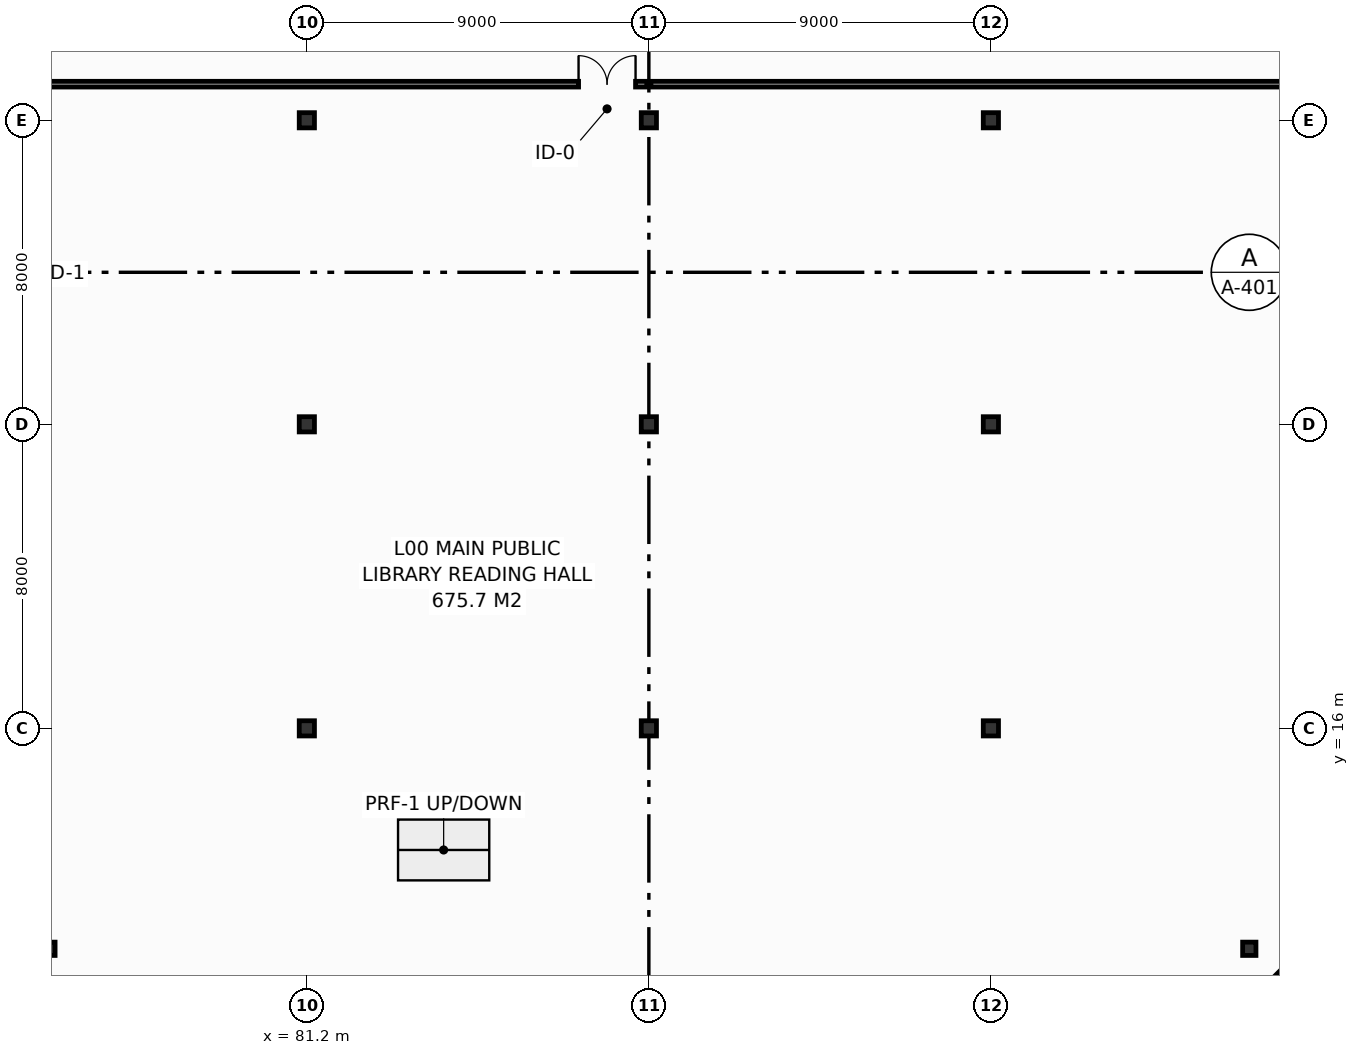
"""IFC4 building model, lengths in metres.
Left out: names, types, materials, properties, quantities, classifications, styles, units other than length and angle.
Written with IfcOpenShell. Run it as: python <this file> out.ifc"""

import sys

from ifc_helpers import new_model, si_unit, direction, frame, frame_2d, origin, origin_2d, place, context, subcontext, project, spatial, rectangle, i_section, extrude, element, fill, save


model = new_model("IFC4")
c1 = context("Model", 3, precision=1e-05, world=origin(), true_north=direction((0.0, 1.0)))
c2 = subcontext(c1, "Body", "Model", "MODEL_VIEW")
j1 = project(units=[si_unit("LENGTHUNIT", "METRE"), si_unit("PLANEANGLEUNIT", "RADIAN")], contexts=[c1])
p1 = place(None, origin())
s1 = spatial("IfcSite", under=j1, at=p1, CompositionType="ELEMENT")
p2 = place(p1, origin())
s2 = spatial("IfcBuilding", under=s1, at=p2, CompositionType="ELEMENT")
p3 = place(p2, origin())
s3 = spatial("IfcBuildingStorey", under=s2, at=p3, CompositionType="ELEMENT", Elevation=0.0)
p4 = place(p3, frame((74.4, 10.2, 0.0), z_axis=(0.0, 0.0, 1.0), x_axis=(1.0, 0.0, 0.0)))
e1 = element("IfcColumn", 1, at=p4, inside=s3, PredefinedType="COLUMN", context=c2, shape_type="SweptSolid", body=[
    extrude(i_section(OverallWidth=0.35, OverallDepth=0.35, WebThickness=0.012, FlangeThickness=0.019, FilletRadius=0.02, at=origin_2d()), origin(), (0.0, 0.0, 1.0), 6.0),
])
for number, where, z_axis, x_axis in (
    (2, (81.2, 16.0, 0.0), (0.0, 0.0, 1.0), (1.0, 0.0, 0.0)),
    (3, (81.2, 24.0, 0.0), (0.0, 0.0, 1.0), (1.0, 0.0, 0.0)),
    (4, (81.2, 32.0, 0.0), (0.0, 0.0, 1.0), (1.0, 0.0, 0.0)),
    (5, (90.2, 16.0, 0.0), (0.0, 0.0, 1.0), (1.0, 0.0, 0.0)),
    (6, (90.2, 24.0, 0.0), (0.0, 0.0, 1.0), (1.0, 0.0, 0.0)),
    (7, (90.2, 32.0, 0.0), (0.0, 0.0, 1.0), (1.0, 0.0, 0.0)),
    (8, (99.2, 16.0, 0.0), (0.0, 0.0, 1.0), (1.0, 0.0, 0.0)),
    (9, (99.2, 24.0, 0.0), (0.0, 0.0, 1.0), (1.0, 0.0, 0.0)),
    (10, (99.2, 32.0, 0.0), (0.0, 0.0, 1.0), (1.0, 0.0, 0.0)),
):
    element("IfcColumn", number, at=place(p3, frame(where, z_axis=z_axis, x_axis=x_axis)), inside=s3, PredefinedType="COLUMN", context=c2, shape_type="SweptSolid", body=[
        extrude(i_section(OverallWidth=0.4, OverallDepth=0.4, WebThickness=0.013, FlangeThickness=0.021, FilletRadius=0.022, at=origin_2d()), origin(), (0.0, 0.0, 1.0), 6.0),
    ])
p5 = place(p3, frame((106.0, 10.2, 0.0), z_axis=(0.0, 0.0, 1.0), x_axis=(1.0, 0.0, 0.0)))
e11 = element("IfcColumn", 11, at=p5, inside=s3, PredefinedType="COLUMN", context=c2, shape_type="SweptSolid", body=[
    extrude(i_section(OverallWidth=0.35, OverallDepth=0.35, WebThickness=0.012, FlangeThickness=0.019, FilletRadius=0.02, at=origin_2d()), origin(), (0.0, 0.0, 1.0), 6.0),
])
p6 = place(p3, frame((74.887, 8.113, 0.0), z_axis=(0.0, 0.0, 1.0), x_axis=(-0.707106781187, 0.707106781187, 0.0)))
e12 = element("IfcWall", 12, at=p6, inside=s3, PredefinedType="STANDARD", context=c2, shape_type="SweptSolid", body=[
    extrude(rectangle(XDim=3.64, YDim=0.3, at=frame_2d((1.82, 0.0))), origin(), (0.0, 0.0, 1.0), 5.7),
])
p7 = place(p3, frame((108.087, 10.687, 0.0), z_axis=(0.0, 0.0, 1.0), x_axis=(-0.707073244381, -0.707140316402, 0.0)))
e13 = element("IfcWall", 13, at=p7, inside=s3, PredefinedType="STANDARD", context=c2, shape_type="SweptSolid", body=[
    extrude(rectangle(XDim=3.64, YDim=0.3, at=frame_2d((1.82, 0.0))), origin(), (0.0, 0.0, 1.0), 5.7),
])
p8 = place(p3, frame((72.37, 32.95, 0.0), z_axis=(0.0, 0.0, 1.0), x_axis=(1.0, 0.0, 0.0)))
e14 = element("IfcWall", 14, at=p8, inside=s3, PredefinedType="PARTITIONING", context=c2, shape_type="SweptSolid", body=[
    extrude(rectangle(XDim=35.66, YDim=0.15, at=frame_2d((17.83, 0.0))), origin(), (0.0, 0.0, 1.0), 4.985),
])
p9 = place(p8, frame((15.98, 0.0, 0.0)))
e15 = element("IfcOpeningElement", 15, at=p9, cuts=e14, PredefinedType="OPENING", context=c2, shape_type="SweptSolid", body=[
    extrude(rectangle(XDim=1.5, YDim=2.2, at=frame_2d((0.75, 1.1))), frame((0.0, 0.085, 0.0), z_axis=(0.0, -1.0, 0.0), x_axis=(1.0, 0.0, 0.0)), (0.0, 0.0, 1.0), 0.17),
])
p10 = place(p9, origin())
e16 = element("IfcDoor", 16, at=p10, inside=s3, OperationType="DOUBLE_DOOR_SINGLE_SWING", PredefinedType="DOOR", context=c2, shape_type="SweptSolid", body=[
    extrude(rectangle(XDim=1.5, YDim=2.2, at=frame_2d((0.75, 1.1))), frame((0.0, 0.025, 0.0), z_axis=(0.0, -1.0, 0.0), x_axis=(1.0, 0.0, 0.0)), (0.0, 0.0, 1.0), 0.05),
])
fill(e15, e16)
save(model, sys.argv[1])
